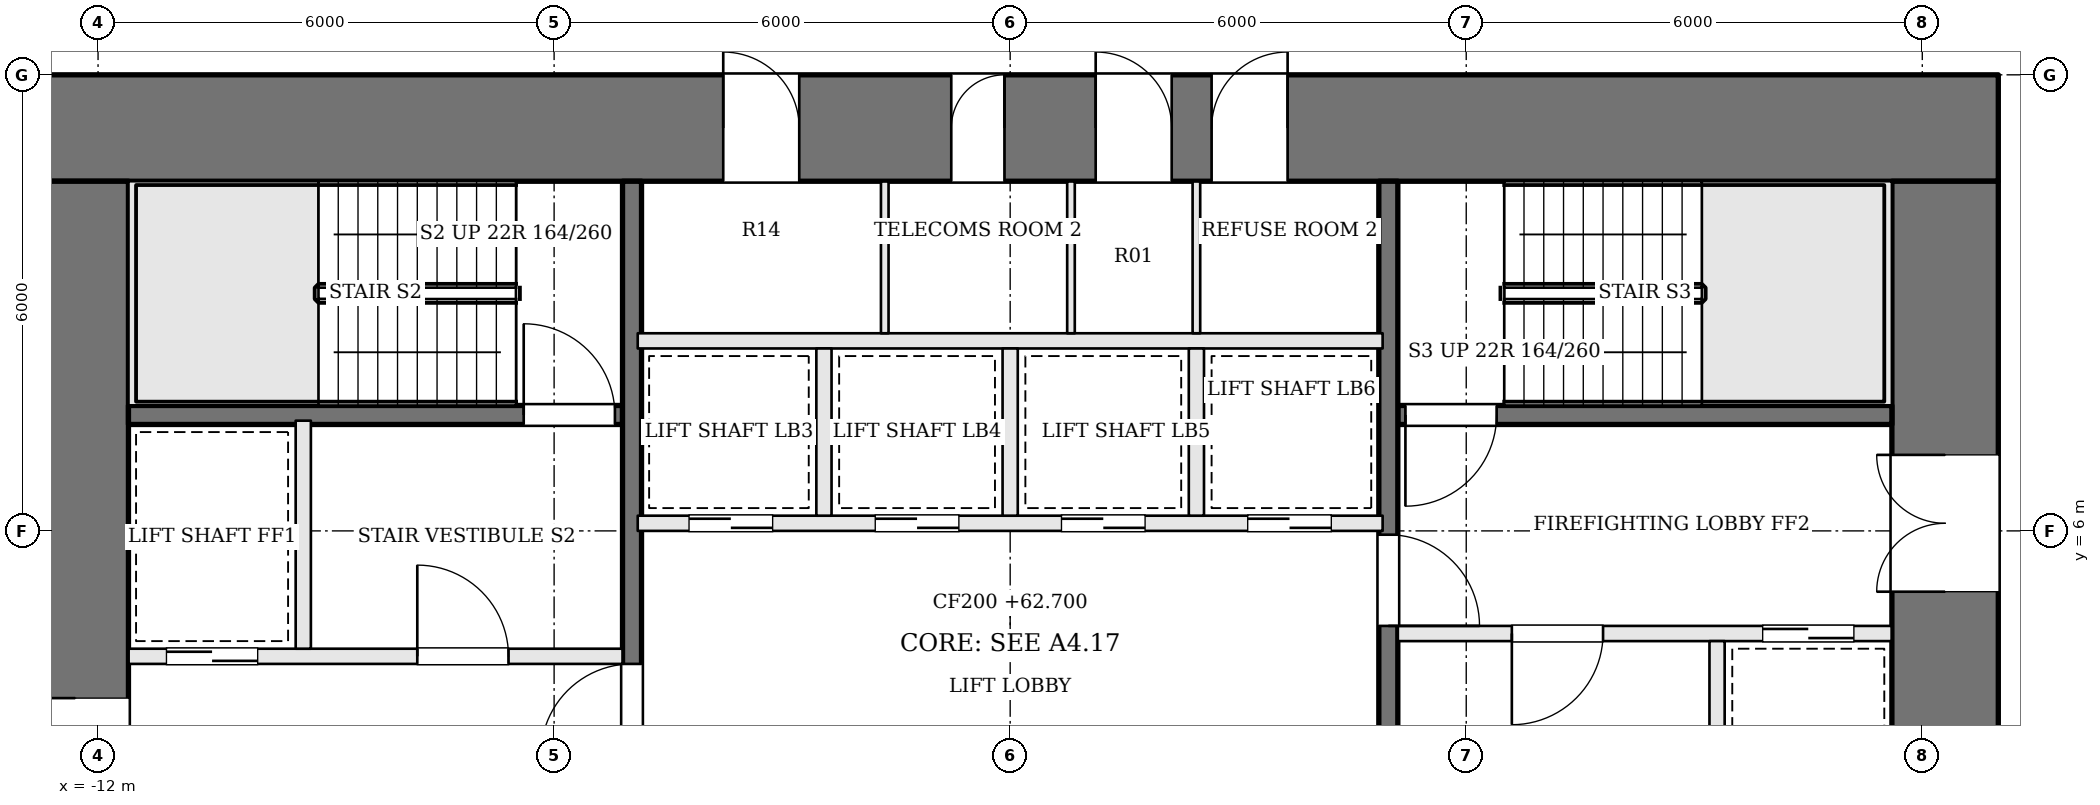
"""IFC4 building model, lengths in metres.
Left out: names, types, materials, properties, quantities, classifications, styles, units other than length and angle.
Written with IfcOpenShell. Run it as: python <this file> out.ifc"""

import sys

from ifc_helpers import new_model, si_unit, direction, frame, frame_2d, origin, place, context, subcontext, project, spatial, rectangle, extrude, element, fill, save


model = new_model("IFC4")
c1 = context("Model", 3, precision=1e-05, world=origin(), true_north=direction((0.0, 1.0)))
c2 = subcontext(c1, "Body", "Model", "MODEL_VIEW")
j1 = project(units=[si_unit("LENGTHUNIT", "METRE"), si_unit("PLANEANGLEUNIT", "RADIAN")], contexts=[c1])
p1 = place(None, origin())
s1 = spatial("IfcSite", under=j1, at=p1, CompositionType="ELEMENT")
p2 = place(p1, origin())
s2 = spatial("IfcBuilding", under=s1, at=p2, CompositionType="ELEMENT")
p3 = place(p2, frame((0.0, 0.0, 62.7)))
s3 = spatial("IfcBuildingStorey", under=s2, at=p3, CompositionType="ELEMENT", Elevation=62.7)
p4 = place(p3, frame((-13.0, 11.3, 0.0), z_axis=(0.0, 0.0, 1.0), x_axis=(1.0, 0.0, 0.0)))
e1 = element("IfcWall", 1, at=p4, inside=s3, PredefinedType="SHEAR", context=c2, shape_type="SweptSolid", body=[
    extrude(rectangle(XDim=26.0, YDim=1.4, at=frame_2d((13.0, 0.0))), origin(), (0.0, 0.0, 1.0), 3.6),
])
p5 = place(p4, frame((9.225, 0.0, 0.0)))
e2 = element("IfcOpeningElement", 2, at=p5, cuts=e1, PredefinedType="OPENING", context=c2, shape_type="SweptSolid", body=[
    extrude(rectangle(XDim=1.0, YDim=2.1, at=frame_2d((0.5, 1.05))), frame((0.0, 0.71, 0.0), z_axis=(0.0, -1.0, 0.0), x_axis=(1.0, 0.0, 0.0)), (0.0, 0.0, 1.0), 1.42),
])
p6 = place(p4, frame((12.225, 0.0, 0.0)))
e3 = element("IfcOpeningElement", 3, at=p6, cuts=e1, PredefinedType="OPENING", context=c2, shape_type="SweptSolid", body=[
    extrude(rectangle(XDim=0.7, YDim=2.1, at=frame_2d((0.35, 1.05))), frame((0.0, 0.71, 0.0), z_axis=(0.0, -1.0, 0.0), x_axis=(1.0, 0.0, 0.0)), (0.0, 0.0, 1.0), 1.42),
])
p7 = place(p4, frame((14.125, 0.0, 0.0)))
e4 = element("IfcOpeningElement", 4, at=p7, cuts=e1, PredefinedType="OPENING", context=c2, shape_type="SweptSolid", body=[
    extrude(rectangle(XDim=1.0, YDim=2.1, at=frame_2d((0.5, 1.05))), frame((0.0, 0.71, 0.0), z_axis=(0.0, -1.0, 0.0), x_axis=(1.0, 0.0, 0.0)), (0.0, 0.0, 1.0), 1.42),
])
p8 = place(p4, frame((15.65, 0.0, 0.0)))
e5 = element("IfcOpeningElement", 5, at=p8, cuts=e1, PredefinedType="OPENING", context=c2, shape_type="SweptSolid", body=[
    extrude(rectangle(XDim=1.0, YDim=2.1, at=frame_2d((0.5, 1.05))), frame((0.0, 0.71, 0.0), z_axis=(0.0, -1.0, 0.0), x_axis=(1.0, 0.0, 0.0)), (0.0, 0.0, 1.0), 1.42),
])
p9 = place(p3, frame((12.3, -1.6, 0.0), z_axis=(0.0, 0.0, 1.0), x_axis=(0.0, 1.0, 0.0)))
e6 = element("IfcWall", 6, at=p9, inside=s3, PredefinedType="SHEAR", context=c2, shape_type="SweptSolid", body=[
    extrude(rectangle(XDim=12.2, YDim=1.4, at=frame_2d((6.1, 0.0))), origin(), (0.0, 0.0, 1.0), 3.6),
])
p10 = place(p9, frame((6.8, 0.0, 0.0)))
e7 = element("IfcOpeningElement", 7, at=p10, cuts=e6, PredefinedType="OPENING", context=c2, shape_type="SweptSolid", body=[
    extrude(rectangle(XDim=1.8, YDim=2.1, at=frame_2d((0.9, 1.05))), frame((0.0, 0.71, 0.0), z_axis=(0.0, -1.0, 0.0), x_axis=(1.0, 0.0, 0.0)), (0.0, 0.0, 1.0), 1.42),
])
p11 = place(p3, frame((-12.3, -1.6, 0.0), z_axis=(0.0, 0.0, 1.0), x_axis=(0.0, 1.0, 0.0)))
e8 = element("IfcWall", 8, at=p11, inside=s3, PredefinedType="SHEAR", context=c2, shape_type="SweptSolid", body=[
    extrude(rectangle(XDim=12.2, YDim=1.4, at=frame_2d((6.1, 0.0))), origin(), (0.0, 0.0, 1.0), 3.6),
])
p12 = place(p11, frame((3.6, 0.0, 0.0)))
e9 = element("IfcOpeningElement", 9, at=p12, cuts=e8, PredefinedType="OPENING", context=c2, shape_type="SweptSolid", body=[
    extrude(rectangle(XDim=1.8, YDim=2.1, at=frame_2d((0.9, 1.05))), frame((0.0, 0.71, 0.0), z_axis=(0.0, -1.0, 0.0), x_axis=(1.0, 0.0, 0.0)), (0.0, 0.0, 1.0), 1.42),
])
p13 = place(p3, frame((11.6, 7.525, 0.0), z_axis=(0.0, 0.0, 1.0), x_axis=(-1.0, 0.0, 0.0)))
e10 = element("IfcWall", 10, at=p13, inside=s3, PredefinedType="SOLIDWALL", context=c2, shape_type="SweptSolid", body=[
    extrude(rectangle(XDim=6.5, YDim=0.25, at=frame_2d((3.25, 0.0))), origin(), (0.0, 0.0, 1.0), 3.4),
])
p14 = place(p13, frame((5.2, 0.0, 0.0)))
e11 = element("IfcOpeningElement", 11, at=p14, cuts=e10, PredefinedType="OPENING", context=c2, shape_type="SweptSolid", body=[
    extrude(rectangle(XDim=1.2, YDim=2.1, at=frame_2d((0.6, 1.05))), frame((0.0, 0.135, 0.0), z_axis=(0.0, -1.0, 0.0), x_axis=(1.0, 0.0, 0.0)), (0.0, 0.0, 1.0), 0.27),
])
p15 = place(p3, frame((-11.6, 4.35, 0.0), z_axis=(0.0, 0.0, 1.0), x_axis=(1.0, 0.0, 0.0)))
e12 = element("IfcWall", 12, at=p15, inside=s3, PredefinedType="SOLIDWALL", context=c2, shape_type="SweptSolid", body=[
    extrude(rectangle(XDim=6.5, YDim=0.2, at=frame_2d((3.25, 0.0))), origin(), (0.0, 0.0, 1.0), 3.4),
])
p16 = place(p15, frame((3.8, 0.0, 0.0)))
e13 = element("IfcOpeningElement", 13, at=p16, cuts=e12, PredefinedType="OPENING", context=c2, shape_type="SweptSolid", body=[
    extrude(rectangle(XDim=1.2, YDim=2.1, at=frame_2d((0.6, 1.05))), frame((0.0, 0.11, 0.0), z_axis=(0.0, -1.0, 0.0), x_axis=(1.0, 0.0, 0.0)), (0.0, 0.0, 1.0), 0.22),
])
p17 = place(p15, frame((0.5, 0.0, 0.0)))
e14 = element("IfcOpeningElement", 14, at=p17, cuts=e12, PredefinedType="OPENING", context=c2, shape_type="SweptSolid", body=[
    extrude(rectangle(XDim=1.2, YDim=2.1, at=frame_2d((0.6, 1.05))), frame((0.0, 0.11, 0.0), z_axis=(0.0, -1.0, 0.0), x_axis=(1.0, 0.0, 0.0)), (0.0, 0.0, 1.0), 0.22),
])
p18 = place(p3, frame((11.6, 4.65, 0.0), z_axis=(0.0, 0.0, 1.0), x_axis=(-1.0, 0.0, 0.0)))
e15 = element("IfcWall", 15, at=p18, inside=s3, PredefinedType="SOLIDWALL", context=c2, shape_type="SweptSolid", body=[
    extrude(rectangle(XDim=6.5, YDim=0.2, at=frame_2d((3.25, 0.0))), origin(), (0.0, 0.0, 1.0), 3.4),
])
p19 = place(p18, frame((3.8, 0.0, 0.0)))
e16 = element("IfcOpeningElement", 16, at=p19, cuts=e15, PredefinedType="OPENING", context=c2, shape_type="SweptSolid", body=[
    extrude(rectangle(XDim=1.2, YDim=2.1, at=frame_2d((0.6, 1.05))), frame((0.0, 0.11, 0.0), z_axis=(0.0, -1.0, 0.0), x_axis=(1.0, 0.0, 0.0)), (0.0, 0.0, 1.0), 0.22),
])
p20 = place(p18, frame((0.5, 0.0, 0.0)))
e17 = element("IfcOpeningElement", 17, at=p20, cuts=e15, PredefinedType="OPENING", context=c2, shape_type="SweptSolid", body=[
    extrude(rectangle(XDim=1.2, YDim=2.1, at=frame_2d((0.6, 1.05))), frame((0.0, 0.11, 0.0), z_axis=(0.0, -1.0, 0.0), x_axis=(1.0, 0.0, 0.0)), (0.0, 0.0, 1.0), 0.22),
])
p21 = place(p3, frame((-11.6, 7.525, 0.0), z_axis=(0.0, 0.0, 1.0), x_axis=(1.0, 0.0, 0.0)))
e18 = element("IfcWall", 18, at=p21, inside=s3, PredefinedType="SOLIDWALL", context=c2, shape_type="SweptSolid", body=[
    extrude(rectangle(XDim=6.5, YDim=0.25, at=frame_2d((3.25, 0.0))), origin(), (0.0, 0.0, 1.0), 3.4),
])
p22 = place(p21, frame((5.2, 0.0, 0.0)))
e19 = element("IfcOpeningElement", 19, at=p22, cuts=e18, PredefinedType="OPENING", context=c2, shape_type="SweptSolid", body=[
    extrude(rectangle(XDim=1.2, YDim=2.1, at=frame_2d((0.6, 1.05))), frame((0.0, 0.135, 0.0), z_axis=(0.0, -1.0, 0.0), x_axis=(1.0, 0.0, 0.0)), (0.0, 0.0, 1.0), 0.27),
])
for number, where, z_axis, x_axis in (
    (20, (-9.3, 4.45, 0.0), (0.0, 0.0, 1.0), (0.0, 1.0, 0.0)),
    (21, (9.3, 4.55, 0.0), (0.0, 0.0, 1.0), (0.0, -1.0, 0.0)),
):
    element("IfcWall", number, at=place(p3, frame(where, z_axis=z_axis, x_axis=x_axis)), inside=s3, PredefinedType="SOLIDWALL", context=c2, shape_type="SweptSolid", body=[
        extrude(rectangle(XDim=3.0, YDim=0.2, at=frame_2d((1.5, 0.0))), origin(), (0.0, 0.0, 1.0), 3.4),
    ])
p23 = place(p3, frame((-4.975, -1.6, 0.0), z_axis=(0.0, 0.0, 1.0), x_axis=(0.0, 1.0, 0.0)))
e22 = element("IfcWall", 22, at=p23, inside=s3, PredefinedType="SOLIDWALL", context=c2, shape_type="SweptSolid", body=[
    extrude(rectangle(XDim=12.2, YDim=0.25, at=frame_2d((6.1, 0.0))), origin(), (0.0, 0.0, 1.0), 3.4),
])
p24 = place(p23, frame((4.65, 0.0, 0.0)))
e23 = element("IfcOpeningElement", 23, at=p24, cuts=e22, PredefinedType="OPENING", context=c2, shape_type="SweptSolid", body=[
    extrude(rectangle(XDim=1.2, YDim=2.1, at=frame_2d((0.6, 1.05))), frame((0.0, 0.135, 0.0), z_axis=(0.0, -1.0, 0.0), x_axis=(1.0, 0.0, 0.0)), (0.0, 0.0, 1.0), 0.27),
])
p25 = place(p3, frame((4.975, 10.6, 0.0), z_axis=(0.0, 0.0, 1.0), x_axis=(0.0, -1.0, 0.0)))
e24 = element("IfcWall", 24, at=p25, inside=s3, PredefinedType="SOLIDWALL", context=c2, shape_type="SweptSolid", body=[
    extrude(rectangle(XDim=12.2, YDim=0.25, at=frame_2d((6.1, 0.0))), origin(), (0.0, 0.0, 1.0), 3.4),
])
p26 = place(p25, frame((4.65, 0.0, 0.0)))
e25 = element("IfcOpeningElement", 25, at=p26, cuts=e24, PredefinedType="OPENING", context=c2, shape_type="SweptSolid", body=[
    extrude(rectangle(XDim=1.2, YDim=2.1, at=frame_2d((0.6, 1.05))), frame((0.0, 0.135, 0.0), z_axis=(0.0, -1.0, 0.0), x_axis=(1.0, 0.0, 0.0)), (0.0, 0.0, 1.0), 0.27),
])
p27 = place(p3, frame((-4.9, 6.1, 0.0), z_axis=(0.0, 0.0, 1.0), x_axis=(1.0, 0.0, 0.0)))
e26 = element("IfcWall", 26, at=p27, inside=s3, PredefinedType="SOLIDWALL", context=c2, shape_type="SweptSolid", body=[
    extrude(rectangle(XDim=9.8, YDim=0.2, at=frame_2d((4.9, 0.0))), origin(), (0.0, 0.0, 1.0), 3.4),
])
p28 = place(p27, frame((0.675, 0.0, 0.0)))
e27 = element("IfcOpeningElement", 27, at=p28, cuts=e26, PredefinedType="OPENING", context=c2, shape_type="SweptSolid", body=[
    extrude(rectangle(XDim=1.1, YDim=2.1, at=frame_2d((0.55, 1.05))), frame((0.0, 0.11, 0.0), z_axis=(0.0, -1.0, 0.0), x_axis=(1.0, 0.0, 0.0)), (0.0, 0.0, 1.0), 0.22),
])
p29 = place(p27, frame((3.125, 0.0, 0.0)))
e28 = element("IfcOpeningElement", 28, at=p29, cuts=e26, PredefinedType="OPENING", context=c2, shape_type="SweptSolid", body=[
    extrude(rectangle(XDim=1.1, YDim=2.1, at=frame_2d((0.55, 1.05))), frame((0.0, 0.11, 0.0), z_axis=(0.0, -1.0, 0.0), x_axis=(1.0, 0.0, 0.0)), (0.0, 0.0, 1.0), 0.22),
])
p30 = place(p27, frame((5.575, 0.0, 0.0)))
e29 = element("IfcOpeningElement", 29, at=p30, cuts=e26, PredefinedType="OPENING", context=c2, shape_type="SweptSolid", body=[
    extrude(rectangle(XDim=1.1, YDim=2.1, at=frame_2d((0.55, 1.05))), frame((0.0, 0.11, 0.0), z_axis=(0.0, -1.0, 0.0), x_axis=(1.0, 0.0, 0.0)), (0.0, 0.0, 1.0), 0.22),
])
p31 = place(p27, frame((8.025, 0.0, 0.0)))
e30 = element("IfcOpeningElement", 30, at=p31, cuts=e26, PredefinedType="OPENING", context=c2, shape_type="SweptSolid", body=[
    extrude(rectangle(XDim=1.1, YDim=2.1, at=frame_2d((0.55, 1.05))), frame((0.0, 0.11, 0.0), z_axis=(0.0, -1.0, 0.0), x_axis=(1.0, 0.0, 0.0)), (0.0, 0.0, 1.0), 0.22),
])
p32 = place(p3, frame((-4.9, 8.5, 0.0), z_axis=(0.0, 0.0, 1.0), x_axis=(1.0, 0.0, 0.0)))
e31 = element("IfcWall", 31, at=p32, inside=s3, PredefinedType="SOLIDWALL", context=c2, shape_type="SweptSolid", body=[
    extrude(rectangle(XDim=9.8, YDim=0.2, at=frame_2d((4.9, 0.0))), origin(), (0.0, 0.0, 1.0), 3.4),
])
for number, where, z_axis, x_axis in (
    (32, (-2.45, 6.2, 0.0), (0.0, 0.0, 1.0), (0.0, 1.0, 0.0)),
    (33, (0.0, 6.2, 0.0), (0.0, 0.0, 1.0), (0.0, 1.0, 0.0)),
    (34, (2.45, 6.2, 0.0), (0.0, 0.0, 1.0), (0.0, 1.0, 0.0)),
):
    element("IfcWall", number, at=place(p3, frame(where, z_axis=z_axis, x_axis=x_axis)), inside=s3, PredefinedType="SOLIDWALL", context=c2, shape_type="SweptSolid", body=[
        extrude(rectangle(XDim=2.2, YDim=0.2, at=frame_2d((1.1, 0.0))), origin(), (0.0, 0.0, 1.0), 3.4),
    ])
for number, where, z_axis, x_axis in (
    (35, (-1.65, 8.6, 0.0), (0.0, 0.0, 1.0), (0.0, 1.0, 0.0)),
    (36, (0.8, 8.6, 0.0), (0.0, 0.0, 1.0), (0.0, 1.0, 0.0)),
    (37, (2.45, 8.6, 0.0), (0.0, 0.0, 1.0), (0.0, 1.0, 0.0)),
):
    element("IfcWall", number, at=place(p3, frame(where, z_axis=z_axis, x_axis=x_axis)), inside=s3, PredefinedType="PARTITIONING", context=c2, shape_type="SweptSolid", body=[
        extrude(rectangle(XDim=2.0, YDim=0.1, at=frame_2d((1.0, 0.0))), origin(), (0.0, 0.0, 1.0), 3.4),
    ])
p33 = place(p12, origin())
e38 = element("IfcDoor", 38, at=p33, inside=s3, OperationType="DOUBLE_DOOR_SINGLE_SWING", PredefinedType="DOOR", context=c2, shape_type="SweptSolid", body=[
    extrude(rectangle(XDim=1.8, YDim=2.1, at=frame_2d((0.9, 1.05))), frame((0.0, 0.025, 0.0), z_axis=(0.0, -1.0, 0.0), x_axis=(1.0, 0.0, 0.0)), (0.0, 0.0, 1.0), 0.05),
])
fill(e9, e38)
p34 = place(p10, origin())
e39 = element("IfcDoor", 39, at=p34, inside=s3, OperationType="DOUBLE_DOOR_SINGLE_SWING", PredefinedType="DOOR", context=c2, shape_type="SweptSolid", body=[
    extrude(rectangle(XDim=1.8, YDim=2.1, at=frame_2d((0.9, 1.05))), frame((0.0, 0.025, 0.0), z_axis=(0.0, -1.0, 0.0), x_axis=(1.0, 0.0, 0.0)), (0.0, 0.0, 1.0), 0.05),
])
fill(e7, e39)
p35 = place(p24, origin())
e40 = element("IfcDoor", 40, at=p35, inside=s3, OperationType="SINGLE_SWING_LEFT", PredefinedType="DOOR", context=c2, shape_type="SweptSolid", body=[
    extrude(rectangle(XDim=1.2, YDim=2.1, at=frame_2d((0.6, 1.05))), frame((0.0, 0.025, 0.0), z_axis=(0.0, -1.0, 0.0), x_axis=(1.0, 0.0, 0.0)), (0.0, 0.0, 1.0), 0.05),
])
fill(e23, e40)
p36 = place(p26, origin())
e41 = element("IfcDoor", 41, at=p36, inside=s3, OperationType="SINGLE_SWING_RIGHT", PredefinedType="DOOR", context=c2, shape_type="SweptSolid", body=[
    extrude(rectangle(XDim=1.2, YDim=2.1, at=frame_2d((0.6, 1.05))), frame((0.0, 0.025, 0.0), z_axis=(0.0, -1.0, 0.0), x_axis=(1.0, 0.0, 0.0)), (0.0, 0.0, 1.0), 0.05),
])
fill(e25, e41)
p37 = place(p16, origin())
e42 = element("IfcDoor", 42, at=p37, inside=s3, OperationType="SINGLE_SWING_LEFT", PredefinedType="DOOR", context=c2, shape_type="SweptSolid", body=[
    extrude(rectangle(XDim=1.2, YDim=2.1, at=frame_2d((0.6, 1.05))), frame((0.0, 0.025, 0.0), z_axis=(0.0, -1.0, 0.0), x_axis=(1.0, 0.0, 0.0)), (0.0, 0.0, 1.0), 0.05),
])
fill(e13, e42)
p38 = place(p19, origin())
e43 = element("IfcDoor", 43, at=p38, inside=s3, OperationType="SINGLE_SWING_RIGHT", PredefinedType="DOOR", context=c2, shape_type="SweptSolid", body=[
    extrude(rectangle(XDim=1.2, YDim=2.1, at=frame_2d((0.6, 1.05))), frame((0.0, 0.025, 0.0), z_axis=(0.0, -1.0, 0.0), x_axis=(1.0, 0.0, 0.0)), (0.0, 0.0, 1.0), 0.05),
])
fill(e16, e43)
p39 = place(p14, origin())
e44 = element("IfcDoor", 44, at=p39, inside=s3, OperationType="SINGLE_SWING_RIGHT", PredefinedType="DOOR", context=c2, shape_type="SweptSolid", body=[
    extrude(rectangle(XDim=1.2, YDim=2.1, at=frame_2d((0.6, 1.05))), frame((0.0, 0.025, 0.0), z_axis=(0.0, -1.0, 0.0), x_axis=(1.0, 0.0, 0.0)), (0.0, 0.0, 1.0), 0.05),
])
fill(e11, e44)
p40 = place(p22, origin())
e45 = element("IfcDoor", 45, at=p40, inside=s3, OperationType="SINGLE_SWING_LEFT", PredefinedType="DOOR", context=c2, shape_type="SweptSolid", body=[
    extrude(rectangle(XDim=1.2, YDim=2.1, at=frame_2d((0.6, 1.05))), frame((0.0, 0.025, 0.0), z_axis=(0.0, -1.0, 0.0), x_axis=(1.0, 0.0, 0.0)), (0.0, 0.0, 1.0), 0.05),
])
fill(e19, e45)
p41 = place(p17, origin())
e46 = element("IfcDoor", 46, at=p41, inside=s3, OperationType="SLIDING_TO_RIGHT", PredefinedType="DOOR", context=c2, shape_type="SweptSolid", body=[
    extrude(rectangle(XDim=1.2, YDim=2.1, at=frame_2d((0.6, 1.05))), frame((0.0, 0.025, 0.0), z_axis=(0.0, -1.0, 0.0), x_axis=(1.0, 0.0, 0.0)), (0.0, 0.0, 1.0), 0.05),
])
fill(e14, e46)
p42 = place(p20, origin())
e47 = element("IfcDoor", 47, at=p42, inside=s3, OperationType="SLIDING_TO_RIGHT", PredefinedType="DOOR", context=c2, shape_type="SweptSolid", body=[
    extrude(rectangle(XDim=1.2, YDim=2.1, at=frame_2d((0.6, 1.05))), frame((0.0, 0.025, 0.0), z_axis=(0.0, -1.0, 0.0), x_axis=(1.0, 0.0, 0.0)), (0.0, 0.0, 1.0), 0.05),
])
fill(e17, e47)
p43 = place(p28, origin())
e48 = element("IfcDoor", 48, at=p43, inside=s3, OperationType="SLIDING_TO_RIGHT", PredefinedType="DOOR", context=c2, shape_type="SweptSolid", body=[
    extrude(rectangle(XDim=1.1, YDim=2.1, at=frame_2d((0.55, 1.05))), frame((0.0, 0.025, 0.0), z_axis=(0.0, -1.0, 0.0), x_axis=(1.0, 0.0, 0.0)), (0.0, 0.0, 1.0), 0.05),
])
fill(e27, e48)
p44 = place(p29, origin())
e49 = element("IfcDoor", 49, at=p44, inside=s3, OperationType="SLIDING_TO_LEFT", PredefinedType="DOOR", context=c2, shape_type="SweptSolid", body=[
    extrude(rectangle(XDim=1.1, YDim=2.1, at=frame_2d((0.55, 1.05))), frame((0.0, 0.025, 0.0), z_axis=(0.0, -1.0, 0.0), x_axis=(1.0, 0.0, 0.0)), (0.0, 0.0, 1.0), 0.05),
])
fill(e28, e49)
p45 = place(p30, origin())
e50 = element("IfcDoor", 50, at=p45, inside=s3, OperationType="SLIDING_TO_RIGHT", PredefinedType="DOOR", context=c2, shape_type="SweptSolid", body=[
    extrude(rectangle(XDim=1.1, YDim=2.1, at=frame_2d((0.55, 1.05))), frame((0.0, 0.025, 0.0), z_axis=(0.0, -1.0, 0.0), x_axis=(1.0, 0.0, 0.0)), (0.0, 0.0, 1.0), 0.05),
])
fill(e29, e50)
p46 = place(p31, origin())
e51 = element("IfcDoor", 51, at=p46, inside=s3, OperationType="SLIDING_TO_LEFT", PredefinedType="DOOR", context=c2, shape_type="SweptSolid", body=[
    extrude(rectangle(XDim=1.1, YDim=2.1, at=frame_2d((0.55, 1.05))), frame((0.0, 0.025, 0.0), z_axis=(0.0, -1.0, 0.0), x_axis=(1.0, 0.0, 0.0)), (0.0, 0.0, 1.0), 0.05),
])
fill(e30, e51)
p47 = place(p5, origin())
e52 = element("IfcDoor", 52, at=p47, inside=s3, OperationType="SINGLE_SWING_LEFT", PredefinedType="DOOR", context=c2, shape_type="SweptSolid", body=[
    extrude(rectangle(XDim=1.0, YDim=2.1, at=frame_2d((0.5, 1.05))), frame((0.0, 0.025, 0.0), z_axis=(0.0, -1.0, 0.0), x_axis=(1.0, 0.0, 0.0)), (0.0, 0.0, 1.0), 0.05),
])
fill(e2, e52)
p48 = place(p6, origin())
e53 = element("IfcDoor", 53, at=p48, inside=s3, OperationType="SINGLE_SWING_RIGHT", PredefinedType="DOOR", context=c2, shape_type="SweptSolid", body=[
    extrude(rectangle(XDim=0.7, YDim=2.1, at=frame_2d((0.35, 1.05))), frame((0.0, 0.025, 0.0), z_axis=(0.0, -1.0, 0.0), x_axis=(1.0, 0.0, 0.0)), (0.0, 0.0, 1.0), 0.05),
])
fill(e3, e53)
p49 = place(p7, origin())
e54 = element("IfcDoor", 54, at=p49, inside=s3, OperationType="SINGLE_SWING_LEFT", PredefinedType="DOOR", context=c2, shape_type="SweptSolid", body=[
    extrude(rectangle(XDim=1.0, YDim=2.1, at=frame_2d((0.5, 1.05))), frame((0.0, 0.025, 0.0), z_axis=(0.0, -1.0, 0.0), x_axis=(1.0, 0.0, 0.0)), (0.0, 0.0, 1.0), 0.05),
])
fill(e4, e54)
p50 = place(p8, origin())
e55 = element("IfcDoor", 55, at=p50, inside=s3, OperationType="SINGLE_SWING_RIGHT", PredefinedType="DOOR", context=c2, shape_type="SweptSolid", body=[
    extrude(rectangle(XDim=1.0, YDim=2.1, at=frame_2d((0.5, 1.05))), frame((0.0, 0.025, 0.0), z_axis=(0.0, -1.0, 0.0), x_axis=(1.0, 0.0, 0.0)), (0.0, 0.0, 1.0), 0.05),
])
fill(e5, e55)
save(model, sys.argv[1])
